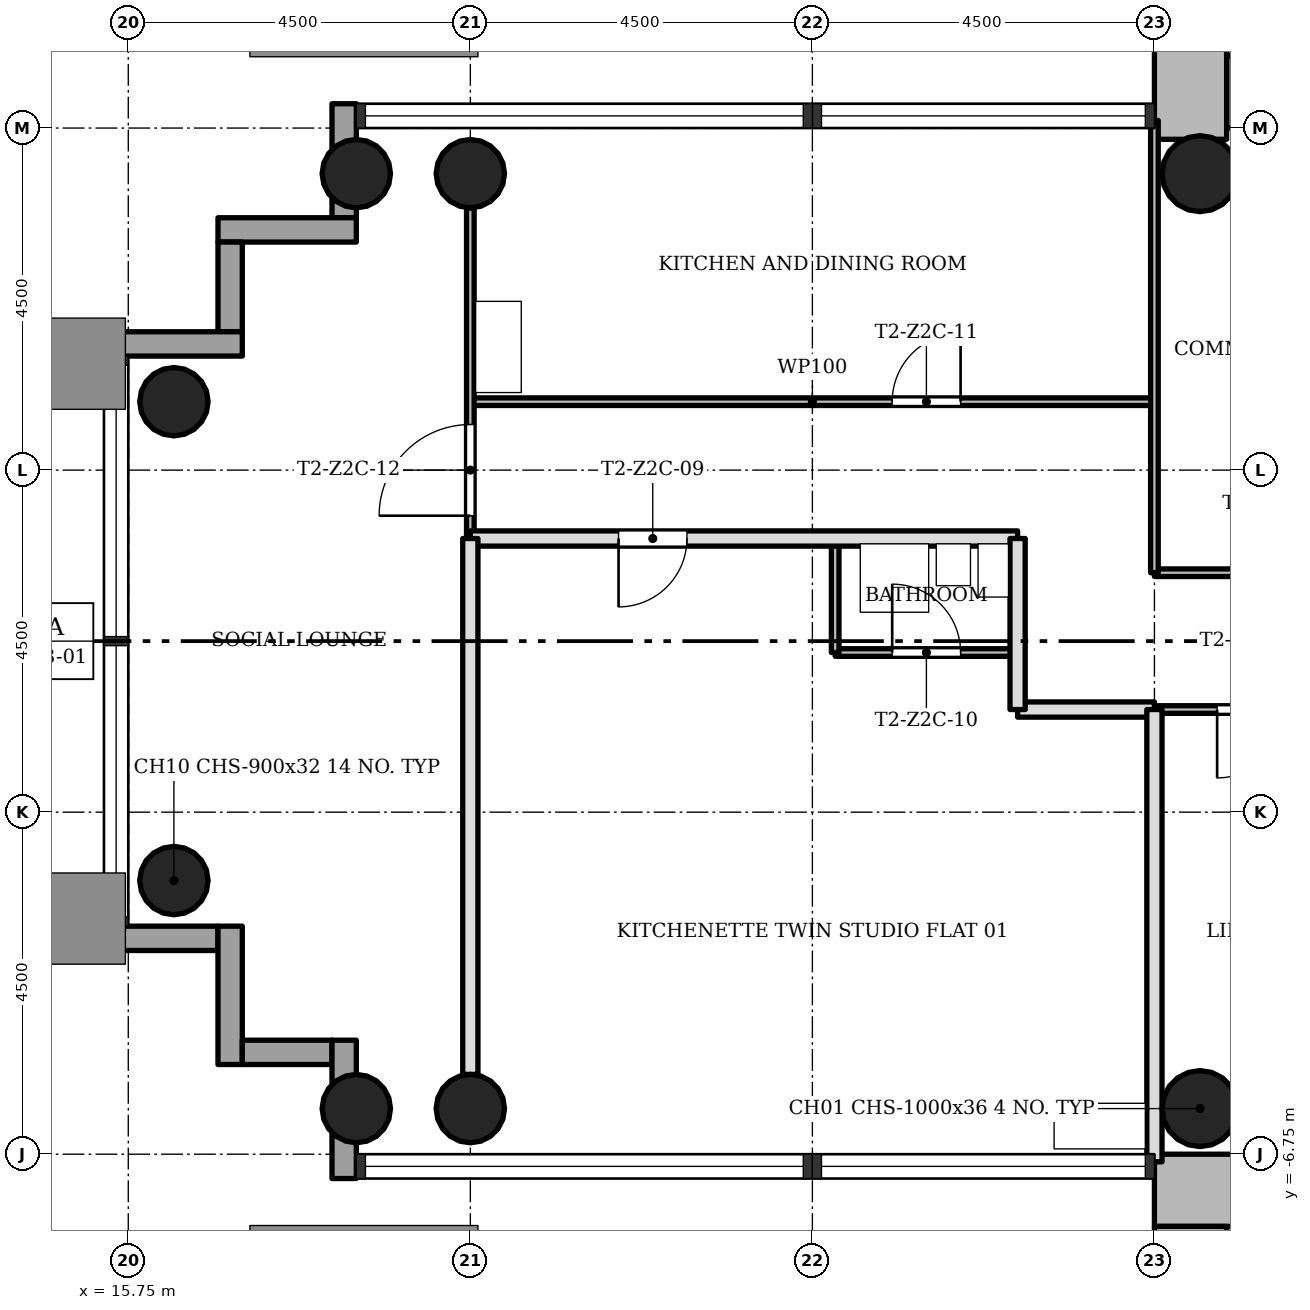
"""IFC4 building model, lengths in metres.
Left out: names, types, materials, properties, quantities, classifications, styles, units other than length and angle.
Written with IfcOpenShell. Run it as: python <this file> out.ifc"""

import sys

from ifc_helpers import new_model, si_unit, direction, frame, frame_2d, origin, origin_2d, place, context, subcontext, project, spatial, rectangle, hollow_circle, extrude, element, fill, save


model = new_model("IFC4")
c1 = context("Model", 3, precision=1e-05, world=origin(), true_north=direction((0.0, 1.0)))
c2 = subcontext(c1, "Body", "Model", "MODEL_VIEW")
j1 = project(units=[si_unit("LENGTHUNIT", "METRE"), si_unit("PLANEANGLEUNIT", "RADIAN")], contexts=[c1])
p1 = place(None, origin())
s1 = spatial("IfcSite", under=j1, at=p1, CompositionType="ELEMENT")
p2 = place(p1, origin())
s2 = spatial("IfcBuilding", under=s1, at=p2, CompositionType="ELEMENT")
p3 = place(p2, frame((0.0, 0.0, 86.8)))
s3 = spatial("IfcBuildingStorey", under=s2, at=p3, CompositionType="ELEMENT", Elevation=86.8)
p4 = place(p3, frame((30.2, 7.225, 0.0), z_axis=(0.0, 0.0, 1.0), x_axis=(1.0, 0.0, 0.0)))
e1 = element("IfcWall", 1, at=p4, inside=s3, PredefinedType="SHEAR", context=c2, shape_type="SweptSolid", body=[
    extrude(rectangle(XDim=12.55, YDim=0.95, at=frame_2d((6.275, 0.0))), origin(), (0.0, 0.0, 1.0), 3.4),
])
p5 = place(p4, frame((4.9, 0.0, 0.0)))
e2 = element("IfcOpeningElement", 2, at=p5, cuts=e1, PredefinedType="OPENING", context=c2, shape_type="SweptSolid", body=[
    extrude(rectangle(XDim=1.8, YDim=2.1, at=frame_2d((0.9, 1.05))), frame((0.0, 0.485, 0.0), z_axis=(0.0, -1.0, 0.0), x_axis=(1.0, 0.0, 0.0)), (0.0, 0.0, 1.0), 0.97),
])
p6 = place(p3, frame((29.725, 15.298, 0.0), z_axis=(0.0, 0.0, 1.0), x_axis=(0.0, -1.0, 0.0)))
e3 = element("IfcWall", 3, at=p6, inside=s3, PredefinedType="SHEAR", context=c2, shape_type="SweptSolid", body=[
    extrude(rectangle(XDim=8.696, YDim=0.95, at=frame_2d((4.348, 0.0))), origin(), (0.0, 0.0, 1.0), 3.4),
])
p7 = place(p3, frame((41.8, -7.225, 0.0), z_axis=(0.0, 0.0, 1.0), x_axis=(-1.0, 0.0, 0.0)))
e4 = element("IfcWall", 4, at=p7, inside=s3, PredefinedType="SHEAR", context=c2, shape_type="SweptSolid", body=[
    extrude(rectangle(XDim=12.55, YDim=0.95, at=frame_2d((6.275, 0.0))), origin(), (0.0, 0.0, 1.0), 3.4),
])
p8 = place(p7, frame((4.9, 0.0, 0.0)))
e5 = element("IfcOpeningElement", 5, at=p8, cuts=e4, PredefinedType="OPENING", context=c2, shape_type="SweptSolid", body=[
    extrude(rectangle(XDim=1.8, YDim=2.1, at=frame_2d((0.9, 1.05))), frame((0.0, 0.485, 0.0), z_axis=(0.0, -1.0, 0.0), x_axis=(1.0, 0.0, 0.0)), (0.0, 0.0, 1.0), 0.97),
])
p9 = place(p3, frame((29.725, -7.7, 0.0), z_axis=(0.0, 0.0, 1.0), x_axis=(0.0, -1.0, 0.0)))
e6 = element("IfcWall", 6, at=p9, inside=s3, PredefinedType="SHEAR", context=c2, shape_type="SweptSolid", body=[
    extrude(rectangle(XDim=8.05, YDim=0.95, at=frame_2d((4.025, 0.0))), origin(), (0.0, 0.0, 1.0), 3.4),
])
for number, where, z_axis, x_axis in (
    (7, (20.25, 6.15, 0.0), (0.0, 0.0, 1.0), (1.0, 0.0, 0.0)),
    (8, (20.25, -6.15, 0.0), (0.0, 0.0, 1.0), (1.0, 0.0, 0.0)),
    (9, (18.75, 6.15, 0.0), (0.0, 0.0, 1.0), (1.0, 0.0, 0.0)),
    (10, (18.75, -6.15, 0.0), (0.0, 0.0, 1.0), (1.0, 0.0, 0.0)),
    (11, (16.35, 3.15, 0.0), (0.0, 0.0, 1.0), (1.0, 0.0, 0.0)),
    (12, (16.35, -3.15, 0.0), (0.0, 0.0, 1.0), (1.0, 0.0, 0.0)),
):
    element("IfcColumn", number, at=place(p3, frame(where, z_axis=z_axis, x_axis=x_axis)), inside=s3, PredefinedType="COLUMN", context=c2, shape_type="SweptSolid", body=[
        extrude(hollow_circle(Radius=0.45, WallThickness=0.032, at=origin_2d()), origin(), (0.0, 0.0, 1.0), 3.4),
    ])
for number, where, z_axis, x_axis in (
    (13, (29.85, 6.15, 0.0), (0.0, 0.0, 1.0), (1.0, 0.0, 0.0)),
    (14, (29.85, -6.15, 0.0), (0.0, 0.0, 1.0), (1.0, 0.0, 0.0)),
):
    element("IfcColumn", number, at=place(p3, frame(where, z_axis=z_axis, x_axis=x_axis)), inside=s3, PredefinedType="COLUMN", context=c2, shape_type="SweptSolid", body=[
        extrude(hollow_circle(Radius=0.5, WallThickness=0.036, at=origin_2d()), origin(), (0.0, 0.0, 1.0), 3.4),
    ])
p10 = place(p3, frame((18.59, 7.07, -0.3), z_axis=(0.0, 0.0, 1.0), x_axis=(0.0, -1.0, 0.0)))
e15 = element("IfcWall", 15, at=p10, inside=s3, PredefinedType="STANDARD", context=c2, shape_type="SweptSolid", body=[
    extrude(rectangle(XDim=1.5, YDim=0.32, at=frame_2d((0.75, 0.0))), origin(), (0.0, 0.0, 1.0), 3.4),
])
p11 = place(p3, frame((18.75, 5.41, -0.3), z_axis=(0.0, 0.0, 1.0), x_axis=(-1.0, 0.0, 0.0)))
e16 = element("IfcWall", 16, at=p11, inside=s3, PredefinedType="STANDARD", context=c2, shape_type="SweptSolid", body=[
    extrude(rectangle(XDim=1.82, YDim=0.32, at=frame_2d((0.91, 0.0))), origin(), (0.0, 0.0, 1.0), 3.4),
])
p12 = place(p3, frame((17.09, 5.25, -0.3), z_axis=(0.0, 0.0, 1.0), x_axis=(0.0, -1.0, 0.0)))
e17 = element("IfcWall", 17, at=p12, inside=s3, PredefinedType="STANDARD", context=c2, shape_type="SweptSolid", body=[
    extrude(rectangle(XDim=1.18, YDim=0.32, at=frame_2d((0.59, 0.0))), origin(), (0.0, 0.0, 1.0), 3.4),
])
p13 = place(p3, frame((17.25, 3.91, -0.3), z_axis=(0.0, 0.0, 1.0), x_axis=(-1.0, 0.0, 0.0)))
e18 = element("IfcWall", 18, at=p13, inside=s3, PredefinedType="STANDARD", context=c2, shape_type="SweptSolid", body=[
    extrude(rectangle(XDim=1.82, YDim=0.32, at=frame_2d((0.91, 0.0))), origin(), (0.0, 0.0, 1.0), 3.4),
])
p14 = place(p3, frame((15.43, -3.91, -0.3), z_axis=(0.0, 0.0, 1.0), x_axis=(1.0, 0.0, 0.0)))
e19 = element("IfcWall", 19, at=p14, inside=s3, PredefinedType="STANDARD", context=c2, shape_type="SweptSolid", body=[
    extrude(rectangle(XDim=1.5, YDim=0.32, at=frame_2d((0.75, 0.0))), origin(), (0.0, 0.0, 1.0), 3.4),
])
p15 = place(p3, frame((17.09, -3.75, -0.3), z_axis=(0.0, 0.0, 1.0), x_axis=(0.0, -1.0, 0.0)))
e20 = element("IfcWall", 20, at=p15, inside=s3, PredefinedType="STANDARD", context=c2, shape_type="SweptSolid", body=[
    extrude(rectangle(XDim=1.82, YDim=0.32, at=frame_2d((0.91, 0.0))), origin(), (0.0, 0.0, 1.0), 3.4),
])
p16 = place(p3, frame((17.25, -5.41, -0.3), z_axis=(0.0, 0.0, 1.0), x_axis=(1.0, 0.0, 0.0)))
e21 = element("IfcWall", 21, at=p16, inside=s3, PredefinedType="STANDARD", context=c2, shape_type="SweptSolid", body=[
    extrude(rectangle(XDim=1.18, YDim=0.32, at=frame_2d((0.59, 0.0))), origin(), (0.0, 0.0, 1.0), 3.4),
])
p17 = place(p3, frame((18.59, -5.25, -0.3), z_axis=(0.0, 0.0, 1.0), x_axis=(0.0, -1.0, 0.0)))
e22 = element("IfcWall", 22, at=p17, inside=s3, PredefinedType="STANDARD", context=c2, shape_type="SweptSolid", body=[
    extrude(rectangle(XDim=1.82, YDim=0.32, at=frame_2d((0.91, 0.0))), origin(), (0.0, 0.0, 1.0), 3.4),
])
p18 = place(p3, frame((34.5, -0.9, 0.0), z_axis=(0.0, 0.0, 1.0), x_axis=(-1.0, 0.0, 0.0)))
e23 = element("IfcWall", 23, at=p18, inside=s3, PredefinedType="PARTITIONING", context=c2, shape_type="SweptSolid", body=[
    extrude(rectangle(XDim=5.25, YDim=0.1, at=frame_2d((2.625, 0.0))), origin(), (0.0, 0.0, 1.0), 3.0),
])
p19 = place(p18, frame((3.525, 0.0, 0.0)))
e24 = element("IfcOpeningElement", 24, at=p19, cuts=e23, PredefinedType="OPENING", context=c2, shape_type="SweptSolid", body=[
    extrude(rectangle(XDim=0.9, YDim=2.1, at=frame_2d((0.45, 1.05))), frame((0.0, 0.06, 0.0), z_axis=(0.0, -1.0, 0.0), x_axis=(1.0, 0.0, 0.0)), (0.0, 0.0, 1.0), 0.12),
])
p20 = place(p3, frame((29.25, -0.9, 0.0), z_axis=(0.0, 0.0, 1.0), x_axis=(-1.0, 0.0, 0.0)))
e25 = element("IfcWall", 25, at=p20, inside=s3, PredefinedType="SOLIDWALL", context=c2, shape_type="SweptSolid", body=[
    extrude(rectangle(XDim=1.8, YDim=0.2, at=frame_2d((0.9, 0.0))), origin(), (0.0, 0.0, 1.0), 3.0),
])
p21 = place(p3, frame((27.45, -0.15, 0.0), z_axis=(0.0, 0.0, 1.0), x_axis=(-1.0, 0.0, 0.0)))
e26 = element("IfcWall", 26, at=p21, inside=s3, PredefinedType="PARTITIONING", context=c2, shape_type="SweptSolid", body=[
    extrude(rectangle(XDim=2.4, YDim=0.1, at=frame_2d((1.2, 0.0))), origin(), (0.0, 0.0, 1.0), 3.0),
])
p22 = place(p21, frame((0.75, 0.0, 0.0)))
e27 = element("IfcOpeningElement", 27, at=p22, cuts=e26, PredefinedType="OPENING", context=c2, shape_type="SweptSolid", body=[
    extrude(rectangle(XDim=0.9, YDim=2.1, at=frame_2d((0.45, 1.05))), frame((0.0, 0.06, 0.0), z_axis=(0.0, -1.0, 0.0), x_axis=(1.0, 0.0, 0.0)), (0.0, 0.0, 1.0), 0.12),
])
p23 = place(p3, frame((34.5, 0.9, 0.0), z_axis=(0.0, 0.0, 1.0), x_axis=(-1.0, 0.0, 0.0)))
e28 = element("IfcWall", 28, at=p23, inside=s3, PredefinedType="PARTITIONING", context=c2, shape_type="SweptSolid", body=[
    extrude(rectangle(XDim=5.25, YDim=0.1, at=frame_2d((2.625, 0.0))), origin(), (0.0, 0.0, 1.0), 3.0),
])
p24 = place(p23, frame((3.225, 0.0, 0.0)))
e29 = element("IfcOpeningElement", 29, at=p24, cuts=e28, PredefinedType="OPENING", context=c2, shape_type="SweptSolid", body=[
    extrude(rectangle(XDim=0.9, YDim=2.1, at=frame_2d((0.45, 1.05))), frame((0.0, 0.06, 0.0), z_axis=(0.0, -1.0, 0.0), x_axis=(1.0, 0.0, 0.0)), (0.0, 0.0, 1.0), 0.12),
])
p25 = place(p3, frame((27.45, 1.35, 0.0), z_axis=(0.0, 0.0, 1.0), x_axis=(-1.0, 0.0, 0.0)))
e30 = element("IfcWall", 30, at=p25, inside=s3, PredefinedType="SOLIDWALL", context=c2, shape_type="SweptSolid", body=[
    extrude(rectangle(XDim=7.2, YDim=0.2, at=frame_2d((3.6, 0.0))), origin(), (0.0, 0.0, 1.0), 3.0),
])
p26 = place(p25, frame((4.35, 0.0, 0.0)))
e31 = element("IfcOpeningElement", 31, at=p26, cuts=e30, PredefinedType="OPENING", context=c2, shape_type="SweptSolid", body=[
    extrude(rectangle(XDim=0.9, YDim=2.1, at=frame_2d((0.45, 1.05))), frame((0.0, 0.11, 0.0), z_axis=(0.0, -1.0, 0.0), x_axis=(1.0, 0.0, 0.0)), (0.0, 0.0, 1.0), 0.22),
])
p27 = place(p3, frame((29.25, 3.15, 0.0), z_axis=(0.0, 0.0, 1.0), x_axis=(-1.0, 0.0, 0.0)))
e32 = element("IfcWall", 32, at=p27, inside=s3, PredefinedType="PARTITIONING", context=c2, shape_type="SweptSolid", body=[
    extrude(rectangle(XDim=9.0, YDim=0.1, at=frame_2d((4.5, 0.0))), origin(), (0.0, 0.0, 1.0), 3.0),
])
p28 = place(p27, frame((2.55, 0.0, 0.0)))
e33 = element("IfcOpeningElement", 33, at=p28, cuts=e32, PredefinedType="OPENING", context=c2, shape_type="SweptSolid", body=[
    extrude(rectangle(XDim=0.9, YDim=2.1, at=frame_2d((0.45, 1.05))), frame((0.0, 0.06, 0.0), z_axis=(0.0, -1.0, 0.0), x_axis=(1.0, 0.0, 0.0)), (0.0, 0.0, 1.0), 0.12),
])
p29 = place(p3, frame((29.25, 0.9, 0.0), z_axis=(0.0, 0.0, 1.0), x_axis=(0.0, 1.0, 0.0)))
e34 = element("IfcWall", 34, at=p29, inside=s3, PredefinedType="PARTITIONING", context=c2, shape_type="SweptSolid", body=[
    extrude(rectangle(XDim=5.95, YDim=0.1, at=frame_2d((2.975, 0.0))), origin(), (0.0, 0.0, 1.0), 3.0),
])
p30 = place(p3, frame((29.25, -6.85, 0.0), z_axis=(0.0, 0.0, 1.0), x_axis=(0.0, 1.0, 0.0)))
e35 = element("IfcWall", 35, at=p30, inside=s3, PredefinedType="SOLIDWALL", context=c2, shape_type="SweptSolid", body=[
    extrude(rectangle(XDim=5.95, YDim=0.2, at=frame_2d((2.975, 0.0))), origin(), (0.0, 0.0, 1.0), 3.0),
])
p31 = place(p3, frame((27.45, -0.9, 0.0), z_axis=(0.0, 0.0, 1.0), x_axis=(0.0, 1.0, 0.0)))
e36 = element("IfcWall", 36, at=p31, inside=s3, PredefinedType="SOLIDWALL", context=c2, shape_type="SweptSolid", body=[
    extrude(rectangle(XDim=2.25, YDim=0.2, at=frame_2d((1.125, 0.0))), origin(), (0.0, 0.0, 1.0), 3.0),
])
p32 = place(p3, frame((25.05, -0.15, 0.0), z_axis=(0.0, 0.0, 1.0), x_axis=(0.0, 1.0, 0.0)))
e37 = element("IfcWall", 37, at=p32, inside=s3, PredefinedType="PARTITIONING", context=c2, shape_type="SweptSolid", body=[
    extrude(rectangle(XDim=1.5, YDim=0.1, at=frame_2d((0.75, 0.0))), origin(), (0.0, 0.0, 1.0), 3.0),
])
p33 = place(p3, frame((20.25, 1.35, 0.0), z_axis=(0.0, 0.0, 1.0), x_axis=(0.0, 1.0, 0.0)))
e38 = element("IfcWall", 38, at=p33, inside=s3, PredefinedType="PARTITIONING", context=c2, shape_type="SweptSolid", body=[
    extrude(rectangle(XDim=4.35, YDim=0.1, at=frame_2d((2.175, 0.0))), origin(), (0.0, 0.0, 1.0), 3.0),
])
p34 = place(p33, frame((0.3, 0.0, 0.0)))
e39 = element("IfcOpeningElement", 39, at=p34, cuts=e38, PredefinedType="OPENING", context=c2, shape_type="SweptSolid", body=[
    extrude(rectangle(XDim=1.2, YDim=2.1, at=frame_2d((0.6, 1.05))), frame((0.0, 0.06, 0.0), z_axis=(0.0, -1.0, 0.0), x_axis=(1.0, 0.0, 0.0)), (0.0, 0.0, 1.0), 0.12),
])
p35 = place(p3, frame((20.25, -5.7, 0.0), z_axis=(0.0, 0.0, 1.0), x_axis=(0.0, 1.0, 0.0)))
e40 = element("IfcWall", 40, at=p35, inside=s3, PredefinedType="SOLIDWALL", context=c2, shape_type="SweptSolid", body=[
    extrude(rectangle(XDim=7.05, YDim=0.2, at=frame_2d((3.525, 0.0))), origin(), (0.0, 0.0, 1.0), 3.0),
])
p36 = place(p3, frame((34.1, 7.825, 0.0), z_axis=(0.0, 0.0, 1.0), x_axis=(-1.0, 0.0, 0.0)))
e41 = element("IfcWall", 41, at=p36, inside=s3, PredefinedType="SHEAR", context=c2, shape_type="SweptSolid", body=[
    extrude(rectangle(XDim=3.9, YDim=0.25, at=frame_2d((1.95, 0.0))), origin(), (0.0, 0.0, 1.0), 3.4),
])
p37 = place(p19, origin())
e42 = element("IfcDoor", 42, at=p37, inside=s3, OperationType="SINGLE_SWING_LEFT", PredefinedType="DOOR", context=c2, shape_type="SweptSolid", body=[
    extrude(rectangle(XDim=0.9, YDim=2.1, at=frame_2d((0.45, 1.05))), frame((0.0, 0.025, 0.0), z_axis=(0.0, -1.0, 0.0), x_axis=(1.0, 0.0, 0.0)), (0.0, 0.0, 1.0), 0.05),
])
fill(e24, e42)
p38 = place(p26, origin())
e43 = element("IfcDoor", 43, at=p38, inside=s3, OperationType="SINGLE_SWING_LEFT", PredefinedType="DOOR", context=c2, shape_type="SweptSolid", body=[
    extrude(rectangle(XDim=0.9, YDim=2.1, at=frame_2d((0.45, 1.05))), frame((0.0, 0.025, 0.0), z_axis=(0.0, -1.0, 0.0), x_axis=(1.0, 0.0, 0.0)), (0.0, 0.0, 1.0), 0.05),
])
fill(e31, e43)
p39 = place(p22, origin())
e44 = element("IfcDoor", 44, at=p39, inside=s3, OperationType="SINGLE_SWING_RIGHT", PredefinedType="DOOR", context=c2, shape_type="SweptSolid", body=[
    extrude(rectangle(XDim=0.9, YDim=2.1, at=frame_2d((0.45, 1.05))), frame((0.0, 0.025, 0.0), z_axis=(0.0, -1.0, 0.0), x_axis=(1.0, 0.0, 0.0)), (0.0, 0.0, 1.0), 0.05),
])
fill(e27, e44)
p40 = place(p28, origin())
e45 = element("IfcDoor", 45, at=p40, inside=s3, OperationType="SINGLE_SWING_LEFT", PredefinedType="DOOR", context=c2, shape_type="SweptSolid", body=[
    extrude(rectangle(XDim=0.9, YDim=2.1, at=frame_2d((0.45, 1.05))), frame((0.0, 0.025, 0.0), z_axis=(0.0, -1.0, 0.0), x_axis=(1.0, 0.0, 0.0)), (0.0, 0.0, 1.0), 0.05),
])
fill(e33, e45)
p41 = place(p34, origin())
e46 = element("IfcDoor", 46, at=p41, inside=s3, OperationType="SINGLE_SWING_RIGHT", PredefinedType="DOOR", context=c2, shape_type="SweptSolid", body=[
    extrude(rectangle(XDim=1.2, YDim=2.1, at=frame_2d((0.6, 1.05))), frame((0.0, 0.025, 0.0), z_axis=(0.0, -1.0, 0.0), x_axis=(1.0, 0.0, 0.0)), (0.0, 0.0, 1.0), 0.05),
])
fill(e39, e46)
save(model, sys.argv[1])
